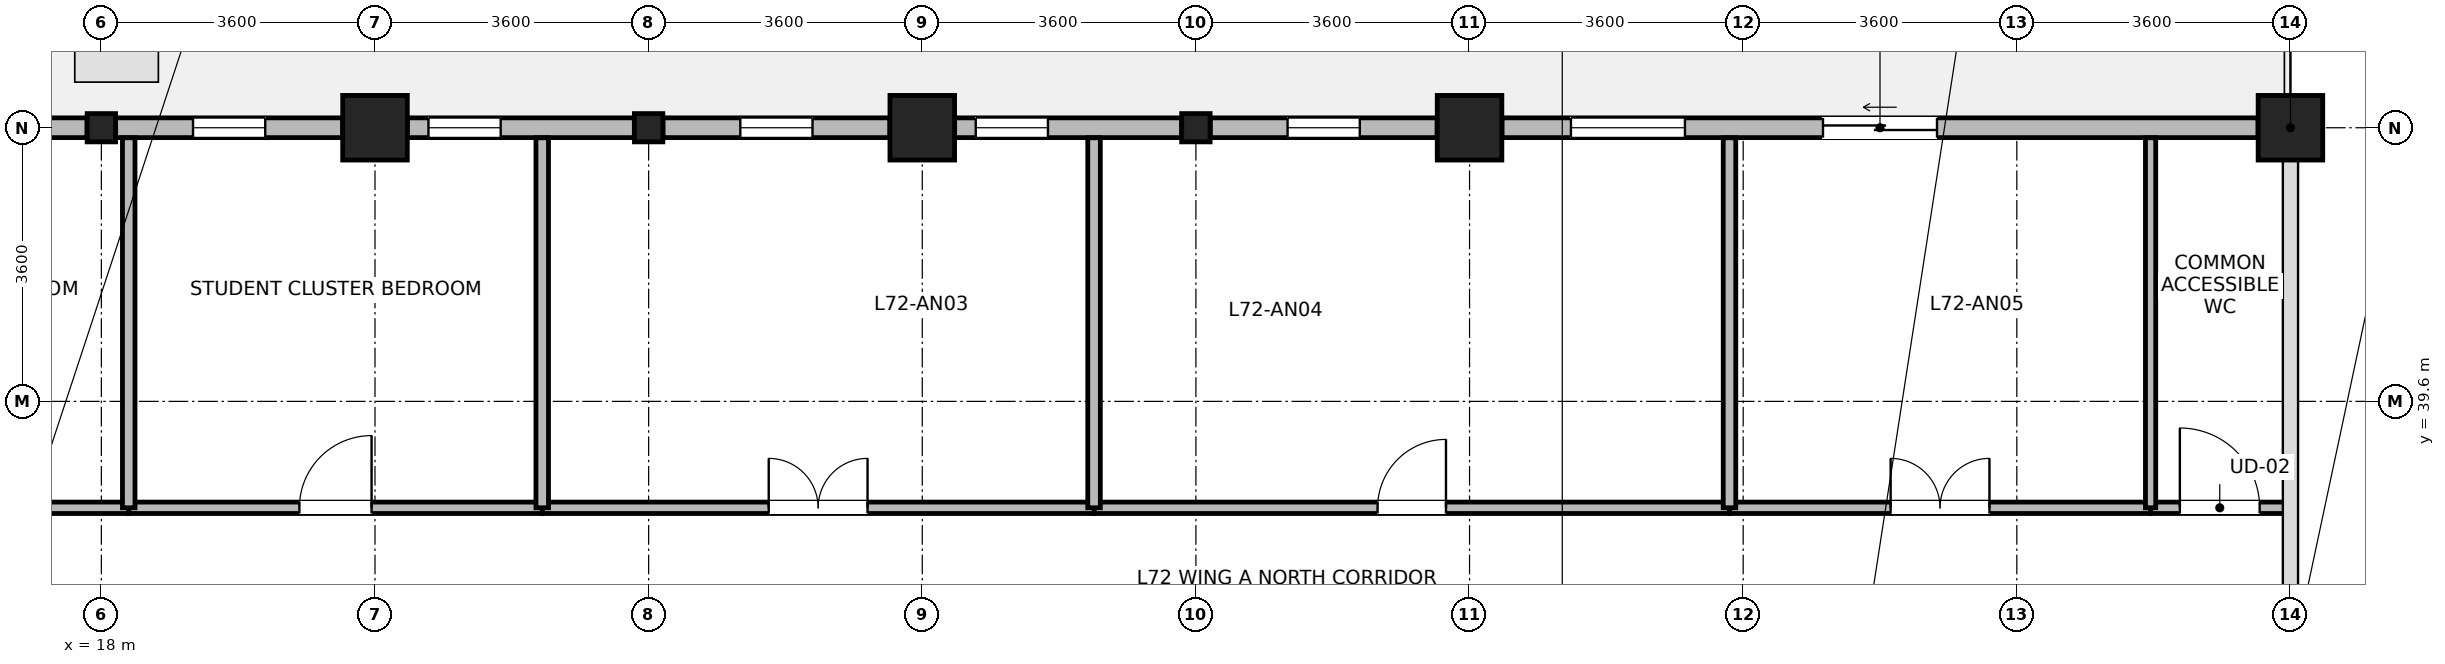
"""IFC4 building model, lengths in metres.
Left out: names, types, materials, properties, quantities, classifications, styles, units other than length and angle.
Written with IfcOpenShell. Run it as: python <this file> out.ifc"""

import sys

from ifc_helpers import new_model, si_unit, direction, frame, frame_2d, origin, origin_2d, place, context, subcontext, project, spatial, rectangle, i_section, extrude, source, transform, mapped, element, fill, save


model = new_model("IFC4")
c1 = context("Model", 3, precision=1e-05, world=origin(), true_north=direction((0.0, 1.0)))
c2 = subcontext(c1, "Body", "Model", "MODEL_VIEW")
j1 = project(units=[si_unit("LENGTHUNIT", "METRE"), si_unit("PLANEANGLEUNIT", "RADIAN")], contexts=[c1])
p1 = place(None, origin())
s1 = spatial("IfcSite", under=j1, at=p1, CompositionType="ELEMENT")
p2 = place(p1, origin())
s2 = spatial("IfcBuilding", under=s1, at=p2, CompositionType="ELEMENT")
p3 = place(p2, frame((0.0, 0.0, 279.5)))
s3 = spatial("IfcBuildingStorey", under=s2, at=p3, CompositionType="ELEMENT", Elevation=279.5)
m1 = source(origin(), c2, "Body", "SweptSolid", [
    extrude(rectangle(XDim=0.85, YDim=0.85, at=origin_2d()), origin(), (0.0, 0.0, 1.0), 3.7),
])
for number, where, z_axis, x_axis in (
    (1, (21.6, 43.2, 0.0), (0.0, 0.0, 1.0), (1.0, 0.0, 0.0)),
    (2, (28.8, 43.2, 0.0), (0.0, 0.0, 1.0), (1.0, 0.0, 0.0)),
    (3, (36.0, 43.2, 0.0), (0.0, 0.0, 1.0), (1.0, 0.0, 0.0)),
    (4, (46.8, 43.2, 0.0), (0.0, 0.0, 1.0), (1.0, 0.0, 0.0)),
):
    element("IfcColumn", number, at=place(p3, frame(where, z_axis=z_axis, x_axis=x_axis)), inside=s3, PredefinedType="COLUMN", context=c2, shape_type="MappedRepresentation", body=[
        mapped(m1, transform((0.0, 0.0, 0.0), x_axis=(1.0, 0.0, 0.0), y_axis=(0.0, 1.0, 0.0), z_axis=(0.0, 0.0, 1.0), scale=1.0)),
    ])
m2 = source(origin(), c2, "Body", "SweptSolid", [
    extrude(i_section(OverallWidth=0.374, OverallDepth=0.372, WebThickness=0.015, FlangeThickness=0.026, FilletRadius=0.015, at=origin_2d()), origin(), (0.0, 0.0, 1.0), 3.7),
])
for number, where, z_axis, x_axis in (
    (5, (18.0, 43.2, 0.0), (0.0, 0.0, 1.0), (1.0, 0.0, 0.0)),
    (6, (25.2, 43.2, 0.0), (0.0, 0.0, 1.0), (1.0, 0.0, 0.0)),
    (7, (32.4, 43.2, 0.0), (0.0, 0.0, 1.0), (1.0, 0.0, 0.0)),
):
    element("IfcColumn", number, at=place(p3, frame(where, z_axis=z_axis, x_axis=x_axis)), inside=s3, PredefinedType="COLUMN", context=c2, shape_type="MappedRepresentation", body=[
        mapped(m2, transform((0.0, 0.0, 0.0), x_axis=(1.0, 0.0, 0.0), y_axis=(0.0, 1.0, 0.0), z_axis=(0.0, 0.0, 1.0), scale=1.0)),
    ])
p4 = place(p3, frame((36.426, 43.2, 0.0), z_axis=(0.0, 0.0, 1.0), x_axis=(1.0, 0.0, 0.0)))
e8 = element("IfcWall", 8, at=p4, inside=s3, PredefinedType="STANDARD", context=c2, shape_type="SweptSolid", body=[
    extrude(rectangle(XDim=9.948, YDim=0.26, at=frame_2d((4.974, 0.0))), origin(), (0.0, 0.0, 1.0), 3.055),
])
p5 = place(p4, frame((4.224, 0.0, 0.0)))
e9 = element("IfcOpeningElement", 9, at=p5, cuts=e8, PredefinedType="OPENING", context=c2, shape_type="SweptSolid", body=[
    extrude(rectangle(XDim=1.5, YDim=2.15, at=frame_2d((0.75, 1.075))), frame((0.0, 0.14, 0.0), z_axis=(0.0, -1.0, 0.0), x_axis=(1.0, 0.0, 0.0)), (0.0, 0.0, 1.0), 0.28),
])
p6 = place(p4, frame((0.908, 0.0, 0.85)))
e10 = element("IfcOpeningElement", 10, at=p6, cuts=e8, PredefinedType="OPENING", context=c2, shape_type="SweptSolid", body=[
    extrude(rectangle(XDim=1.5, YDim=1.85, at=frame_2d((0.75, 0.925))), frame((0.0, 0.14, 0.0), z_axis=(0.0, -1.0, 0.0), x_axis=(1.0, 0.0, 0.0)), (0.0, 0.0, 1.0), 0.28),
])
p7 = place(p3, frame((32.588, 43.2, 0.0), z_axis=(0.0, 0.0, 1.0), x_axis=(1.0, 0.0, 0.0)))
e11 = element("IfcWall", 11, at=p7, inside=s3, PredefinedType="STANDARD", context=c2, shape_type="SweptSolid", body=[
    extrude(rectangle(XDim=2.986, YDim=0.26, at=frame_2d((1.493, 0.0))), origin(), (0.0, 0.0, 1.0), 3.055),
])
p8 = place(p7, frame((1.018, 0.0, 0.85)))
e12 = element("IfcOpeningElement", 12, at=p8, cuts=e11, PredefinedType="OPENING", context=c2, shape_type="SweptSolid", body=[
    extrude(rectangle(XDim=0.95, YDim=1.75, at=frame_2d((0.475, 0.875))), frame((0.0, 0.14, 0.0), z_axis=(0.0, -1.0, 0.0), x_axis=(1.0, 0.0, 0.0)), (0.0, 0.0, 1.0), 0.28),
])
p9 = place(p3, frame((29.226, 43.2, 0.0), z_axis=(0.0, 0.0, 1.0), x_axis=(1.0, 0.0, 0.0)))
e13 = element("IfcWall", 13, at=p9, inside=s3, PredefinedType="STANDARD", context=c2, shape_type="SweptSolid", body=[
    extrude(rectangle(XDim=2.986, YDim=0.26, at=frame_2d((1.493, 0.0))), origin(), (0.0, 0.0, 1.0), 3.055),
])
p10 = place(p9, frame((0.278, 0.0, 0.85)))
e14 = element("IfcOpeningElement", 14, at=p10, cuts=e13, PredefinedType="OPENING", context=c2, shape_type="SweptSolid", body=[
    extrude(rectangle(XDim=0.95, YDim=1.75, at=frame_2d((0.475, 0.875))), frame((0.0, 0.14, 0.0), z_axis=(0.0, -1.0, 0.0), x_axis=(1.0, 0.0, 0.0)), (0.0, 0.0, 1.0), 0.28),
])
p11 = place(p3, frame((25.388, 43.2, 0.0), z_axis=(0.0, 0.0, 1.0), x_axis=(1.0, 0.0, 0.0)))
e15 = element("IfcWall", 15, at=p11, inside=s3, PredefinedType="STANDARD", context=c2, shape_type="SweptSolid", body=[
    extrude(rectangle(XDim=2.986, YDim=0.26, at=frame_2d((1.493, 0.0))), origin(), (0.0, 0.0, 1.0), 3.055),
])
p12 = place(p11, frame((1.018, 0.0, 0.85)))
e16 = element("IfcOpeningElement", 16, at=p12, cuts=e15, PredefinedType="OPENING", context=c2, shape_type="SweptSolid", body=[
    extrude(rectangle(XDim=0.95, YDim=1.75, at=frame_2d((0.475, 0.875))), frame((0.0, 0.14, 0.0), z_axis=(0.0, -1.0, 0.0), x_axis=(1.0, 0.0, 0.0)), (0.0, 0.0, 1.0), 0.28),
])
p13 = place(p3, frame((22.026, 43.2, 0.0), z_axis=(0.0, 0.0, 1.0), x_axis=(1.0, 0.0, 0.0)))
e17 = element("IfcWall", 17, at=p13, inside=s3, PredefinedType="STANDARD", context=c2, shape_type="SweptSolid", body=[
    extrude(rectangle(XDim=2.986, YDim=0.26, at=frame_2d((1.493, 0.0))), origin(), (0.0, 0.0, 1.0), 3.055),
])
p14 = place(p13, frame((0.278, 0.0, 0.85)))
e18 = element("IfcOpeningElement", 18, at=p14, cuts=e17, PredefinedType="OPENING", context=c2, shape_type="SweptSolid", body=[
    extrude(rectangle(XDim=0.95, YDim=1.75, at=frame_2d((0.475, 0.875))), frame((0.0, 0.14, 0.0), z_axis=(0.0, -1.0, 0.0), x_axis=(1.0, 0.0, 0.0)), (0.0, 0.0, 1.0), 0.28),
])
p15 = place(p3, frame((18.188, 43.2, 0.0), z_axis=(0.0, 0.0, 1.0), x_axis=(1.0, 0.0, 0.0)))
e19 = element("IfcWall", 19, at=p15, inside=s3, PredefinedType="STANDARD", context=c2, shape_type="SweptSolid", body=[
    extrude(rectangle(XDim=2.986, YDim=0.26, at=frame_2d((1.493, 0.0))), origin(), (0.0, 0.0, 1.0), 3.055),
])
p16 = place(p15, frame((1.018, 0.0, 0.85)))
e20 = element("IfcOpeningElement", 20, at=p16, cuts=e19, PredefinedType="OPENING", context=c2, shape_type="SweptSolid", body=[
    extrude(rectangle(XDim=0.95, YDim=1.75, at=frame_2d((0.475, 0.875))), frame((0.0, 0.14, 0.0), z_axis=(0.0, -1.0, 0.0), x_axis=(1.0, 0.0, 0.0)), (0.0, 0.0, 1.0), 0.28),
])
p17 = place(p3, frame((14.826, 43.2, 0.0), z_axis=(0.0, 0.0, 1.0), x_axis=(1.0, 0.0, 0.0)))
e21 = element("IfcWall", 21, at=p17, inside=s3, PredefinedType="STANDARD", context=c2, shape_type="SweptSolid", body=[
    extrude(rectangle(XDim=2.986, YDim=0.26, at=frame_2d((1.493, 0.0))), origin(), (0.0, 0.0, 1.0), 3.055),
])
p18 = place(p17, frame((1.018, 0.0, 0.85)))
e22 = element("IfcOpeningElement", 22, at=p18, cuts=e21, PredefinedType="OPENING", context=c2, shape_type="SweptSolid", body=[
    extrude(rectangle(XDim=0.95, YDim=1.75, at=frame_2d((0.475, 0.875))), frame((0.0, 0.14, 0.0), z_axis=(0.0, -1.0, 0.0), x_axis=(1.0, 0.0, 0.0)), (0.0, 0.0, 1.0), 0.28),
])
p19 = place(p3, frame((31.06, 38.2, 0.0), z_axis=(0.0, 0.0, 1.0), x_axis=(1.0, 0.0, 0.0)))
e23 = element("IfcWall", 23, at=p19, inside=s3, PredefinedType="PARTITIONING", context=c2, shape_type="SweptSolid", body=[
    extrude(rectangle(XDim=8.36, YDim=0.15, at=frame_2d((4.18, 0.0))), origin(), (0.0, 0.0, 1.0), 3.455),
])
p20 = place(p19, frame((3.73, 0.0, 0.0)))
e24 = element("IfcOpeningElement", 24, at=p20, cuts=e23, PredefinedType="OPENING", context=c2, shape_type="SweptSolid", body=[
    extrude(rectangle(XDim=0.9, YDim=2.08, at=frame_2d((0.45, 1.04))), frame((0.0, 0.085, 0.0), z_axis=(0.0, -1.0, 0.0), x_axis=(1.0, 0.0, 0.0)), (0.0, 0.0, 1.0), 0.17),
])
p21 = place(p3, frame((23.8, 38.2, 0.0), z_axis=(0.0, 0.0, 1.0), x_axis=(1.0, 0.0, 0.0)))
e25 = element("IfcWall", 25, at=p21, inside=s3, PredefinedType="PARTITIONING", context=c2, shape_type="SweptSolid", body=[
    extrude(rectangle(XDim=7.26, YDim=0.15, at=frame_2d((3.63, 0.0))), origin(), (0.0, 0.0, 1.0), 3.455),
])
p22 = place(p21, frame((2.98, 0.0, 0.0)))
e26 = element("IfcOpeningElement", 26, at=p22, cuts=e25, PredefinedType="OPENING", context=c2, shape_type="SweptSolid", body=[
    extrude(rectangle(XDim=1.3, YDim=2.12, at=frame_2d((0.65, 1.06))), frame((0.0, 0.085, 0.0), z_axis=(0.0, -1.0, 0.0), x_axis=(1.0, 0.0, 0.0)), (0.0, 0.0, 1.0), 0.17),
])
p23 = place(p3, frame((39.42, 38.2, 0.0), z_axis=(0.0, 0.0, 1.0), x_axis=(1.0, 0.0, 0.0)))
e27 = element("IfcWall", 27, at=p23, inside=s3, PredefinedType="PARTITIONING", context=c2, shape_type="SweptSolid", body=[
    extrude(rectangle(XDim=5.54, YDim=0.15, at=frame_2d((2.77, 0.0))), origin(), (0.0, 0.0, 1.0), 3.455),
])
p24 = place(p23, frame((2.12, 0.0, 0.0)))
e28 = element("IfcOpeningElement", 28, at=p24, cuts=e27, PredefinedType="OPENING", context=c2, shape_type="SweptSolid", body=[
    extrude(rectangle(XDim=1.3, YDim=2.12, at=frame_2d((0.65, 1.06))), frame((0.0, 0.085, 0.0), z_axis=(0.0, -1.0, 0.0), x_axis=(1.0, 0.0, 0.0)), (0.0, 0.0, 1.0), 0.17),
])
p25 = place(p3, frame((18.36, 38.2, 0.0), z_axis=(0.0, 0.0, 1.0), x_axis=(1.0, 0.0, 0.0)))
e29 = element("IfcWall", 29, at=p25, inside=s3, PredefinedType="PARTITIONING", context=c2, shape_type="SweptSolid", body=[
    extrude(rectangle(XDim=5.44, YDim=0.15, at=frame_2d((2.72, 0.0))), origin(), (0.0, 0.0, 1.0), 3.455),
])
p26 = place(p25, frame((2.245, 0.0, 0.0)))
e30 = element("IfcOpeningElement", 30, at=p26, cuts=e29, PredefinedType="OPENING", context=c2, shape_type="SweptSolid", body=[
    extrude(rectangle(XDim=0.95, YDim=2.1, at=frame_2d((0.475, 1.05))), frame((0.0, 0.085, 0.0), z_axis=(0.0, -1.0, 0.0), x_axis=(1.0, 0.0, 0.0)), (0.0, 0.0, 1.0), 0.17),
])
p27 = place(p3, frame((13.2, 38.2, 0.0), z_axis=(0.0, 0.0, 1.0), x_axis=(1.0, 0.0, 0.0)))
e31 = element("IfcWall", 31, at=p27, inside=s3, PredefinedType="PARTITIONING", context=c2, shape_type="SweptSolid", body=[
    extrude(rectangle(XDim=5.16, YDim=0.15, at=frame_2d((2.58, 0.0))), origin(), (0.0, 0.0, 1.0), 3.455),
])
p28 = place(p27, frame((2.105, 0.0, 0.0)))
e32 = element("IfcOpeningElement", 32, at=p28, cuts=e31, PredefinedType="OPENING", context=c2, shape_type="SweptSolid", body=[
    extrude(rectangle(XDim=0.95, YDim=2.1, at=frame_2d((0.475, 1.05))), frame((0.0, 0.085, 0.0), z_axis=(0.0, -1.0, 0.0), x_axis=(1.0, 0.0, 0.0)), (0.0, 0.0, 1.0), 0.17),
])
p29 = place(p3, frame((44.96, 38.2, 0.0), z_axis=(0.0, 0.0, 1.0), x_axis=(1.0, 0.0, 0.0)))
e33 = element("IfcWall", 33, at=p29, inside=s3, PredefinedType="PARTITIONING", context=c2, shape_type="SweptSolid", body=[
    extrude(rectangle(XDim=1.82, YDim=0.15, at=frame_2d((0.91, 0.0))), origin(), (0.0, 0.0, 1.0), 3.455),
])
p30 = place(p29, frame((0.385, 0.0, 0.0)))
e34 = element("IfcOpeningElement", 34, at=p30, cuts=e33, PredefinedType="OPENING", context=c2, shape_type="SweptSolid", body=[
    extrude(rectangle(XDim=1.05, YDim=2.12, at=frame_2d((0.525, 1.06))), frame((0.0, 0.085, 0.0), z_axis=(0.0, -1.0, 0.0), x_axis=(1.0, 0.0, 0.0)), (0.0, 0.0, 1.0), 0.17),
])
for number, where, z_axis, x_axis in (
    (35, (18.36, 38.2, 0.0), (0.0, 0.0, 1.0), (0.0, 1.0, 0.0)),
    (36, (23.8, 38.2, 0.0), (0.0, 0.0, 1.0), (0.0, 1.0, 0.0)),
    (37, (31.06, 38.2, 0.0), (0.0, 0.0, 1.0), (0.0, 1.0, 0.0)),
    (38, (39.42, 38.2, 0.0), (0.0, 0.0, 1.0), (0.0, 1.0, 0.0)),
):
    element("IfcWall", number, at=place(p3, frame(where, z_axis=z_axis, x_axis=x_axis)), inside=s3, PredefinedType="PARTITIONING", context=c2, shape_type="SweptSolid", body=[
        extrude(rectangle(XDim=4.868, YDim=0.165, at=frame_2d((2.434, 0.0))), origin(), (0.0, 0.0, 1.0), 3.455),
    ])
p31 = place(p3, frame((44.96, 38.2, 0.0), z_axis=(0.0, 0.0, 1.0), x_axis=(0.0, 1.0, 0.0)))
e39 = element("IfcWall", 39, at=p31, inside=s3, PredefinedType="PARTITIONING", context=c2, shape_type="SweptSolid", body=[
    extrude(rectangle(XDim=4.868, YDim=0.135, at=frame_2d((2.434, 0.0))), origin(), (0.0, 0.0, 1.0), 3.455),
])
p32 = place(p5, origin())
e40 = element("IfcDoor", 40, at=p32, inside=s3, OperationType="SLIDING_TO_LEFT", PredefinedType="DOOR", context=c2, shape_type="SweptSolid", body=[
    extrude(rectangle(XDim=1.5, YDim=2.15, at=frame_2d((0.75, 1.075))), frame((0.0, 0.025, 0.0), z_axis=(0.0, -1.0, 0.0), x_axis=(1.0, 0.0, 0.0)), (0.0, 0.0, 1.0), 0.05),
])
fill(e9, e40)
p33 = place(p6, origin())
e41 = element("IfcWindow", 41, at=p33, inside=s3, PartitioningType="SINGLE_PANEL", PredefinedType="WINDOW", context=c2, shape_type="SweptSolid", body=[
    extrude(rectangle(XDim=1.5, YDim=1.85, at=frame_2d((0.75, 0.925))), frame((0.0, 0.03, 0.0), z_axis=(0.0, -1.0, 0.0), x_axis=(1.0, 0.0, 0.0)), (0.0, 0.0, 1.0), 0.06),
])
fill(e10, e41)
p34 = place(p8, origin())
e42 = element("IfcWindow", 42, at=p34, inside=s3, PartitioningType="SINGLE_PANEL", PredefinedType="WINDOW", context=c2, shape_type="SweptSolid", body=[
    extrude(rectangle(XDim=0.95, YDim=1.75, at=frame_2d((0.475, 0.875))), frame((0.0, 0.03, 0.0), z_axis=(0.0, -1.0, 0.0), x_axis=(1.0, 0.0, 0.0)), (0.0, 0.0, 1.0), 0.06),
])
fill(e12, e42)
p35 = place(p10, origin())
e43 = element("IfcWindow", 43, at=p35, inside=s3, PartitioningType="SINGLE_PANEL", PredefinedType="WINDOW", context=c2, shape_type="SweptSolid", body=[
    extrude(rectangle(XDim=0.95, YDim=1.75, at=frame_2d((0.475, 0.875))), frame((0.0, 0.03, 0.0), z_axis=(0.0, -1.0, 0.0), x_axis=(1.0, 0.0, 0.0)), (0.0, 0.0, 1.0), 0.06),
])
fill(e14, e43)
p36 = place(p12, origin())
e44 = element("IfcWindow", 44, at=p36, inside=s3, PartitioningType="SINGLE_PANEL", PredefinedType="WINDOW", context=c2, shape_type="SweptSolid", body=[
    extrude(rectangle(XDim=0.95, YDim=1.75, at=frame_2d((0.475, 0.875))), frame((0.0, 0.03, 0.0), z_axis=(0.0, -1.0, 0.0), x_axis=(1.0, 0.0, 0.0)), (0.0, 0.0, 1.0), 0.06),
])
fill(e16, e44)
p37 = place(p14, origin())
e45 = element("IfcWindow", 45, at=p37, inside=s3, PartitioningType="SINGLE_PANEL", PredefinedType="WINDOW", context=c2, shape_type="SweptSolid", body=[
    extrude(rectangle(XDim=0.95, YDim=1.75, at=frame_2d((0.475, 0.875))), frame((0.0, 0.03, 0.0), z_axis=(0.0, -1.0, 0.0), x_axis=(1.0, 0.0, 0.0)), (0.0, 0.0, 1.0), 0.06),
])
fill(e18, e45)
p38 = place(p16, origin())
e46 = element("IfcWindow", 46, at=p38, inside=s3, PartitioningType="SINGLE_PANEL", PredefinedType="WINDOW", context=c2, shape_type="SweptSolid", body=[
    extrude(rectangle(XDim=0.95, YDim=1.75, at=frame_2d((0.475, 0.875))), frame((0.0, 0.03, 0.0), z_axis=(0.0, -1.0, 0.0), x_axis=(1.0, 0.0, 0.0)), (0.0, 0.0, 1.0), 0.06),
])
fill(e20, e46)
p39 = place(p20, origin())
e47 = element("IfcDoor", 47, at=p39, inside=s3, OperationType="SINGLE_SWING_RIGHT", PredefinedType="DOOR", context=c2, shape_type="SweptSolid", body=[
    extrude(rectangle(XDim=0.9, YDim=2.08, at=frame_2d((0.45, 1.04))), frame((0.0, 0.025, 0.0), z_axis=(0.0, -1.0, 0.0), x_axis=(1.0, 0.0, 0.0)), (0.0, 0.0, 1.0), 0.05),
])
fill(e24, e47)
p40 = place(p22, origin())
e48 = element("IfcDoor", 48, at=p40, inside=s3, OperationType="DOUBLE_DOOR_SINGLE_SWING", PredefinedType="DOOR", context=c2, shape_type="SweptSolid", body=[
    extrude(rectangle(XDim=1.3, YDim=2.12, at=frame_2d((0.65, 1.06))), frame((0.0, 0.025, 0.0), z_axis=(0.0, -1.0, 0.0), x_axis=(1.0, 0.0, 0.0)), (0.0, 0.0, 1.0), 0.05),
])
fill(e26, e48)
p41 = place(p24, origin())
e49 = element("IfcDoor", 49, at=p41, inside=s3, OperationType="DOUBLE_DOOR_SINGLE_SWING", PredefinedType="DOOR", context=c2, shape_type="SweptSolid", body=[
    extrude(rectangle(XDim=1.3, YDim=2.12, at=frame_2d((0.65, 1.06))), frame((0.0, 0.025, 0.0), z_axis=(0.0, -1.0, 0.0), x_axis=(1.0, 0.0, 0.0)), (0.0, 0.0, 1.0), 0.05),
])
fill(e28, e49)
p42 = place(p26, origin())
e50 = element("IfcDoor", 50, at=p42, inside=s3, OperationType="SINGLE_SWING_RIGHT", PredefinedType="DOOR", context=c2, shape_type="SweptSolid", body=[
    extrude(rectangle(XDim=0.95, YDim=2.1, at=frame_2d((0.475, 1.05))), frame((0.0, 0.025, 0.0), z_axis=(0.0, -1.0, 0.0), x_axis=(1.0, 0.0, 0.0)), (0.0, 0.0, 1.0), 0.05),
])
fill(e30, e50)
p43 = place(p30, origin())
e51 = element("IfcDoor", 51, at=p43, inside=s3, OperationType="SINGLE_SWING_LEFT", PredefinedType="DOOR", context=c2, shape_type="SweptSolid", body=[
    extrude(rectangle(XDim=1.05, YDim=2.12, at=frame_2d((0.525, 1.06))), frame((0.0, 0.025, 0.0), z_axis=(0.0, -1.0, 0.0), x_axis=(1.0, 0.0, 0.0)), (0.0, 0.0, 1.0), 0.05),
])
fill(e34, e51)
save(model, sys.argv[1])
